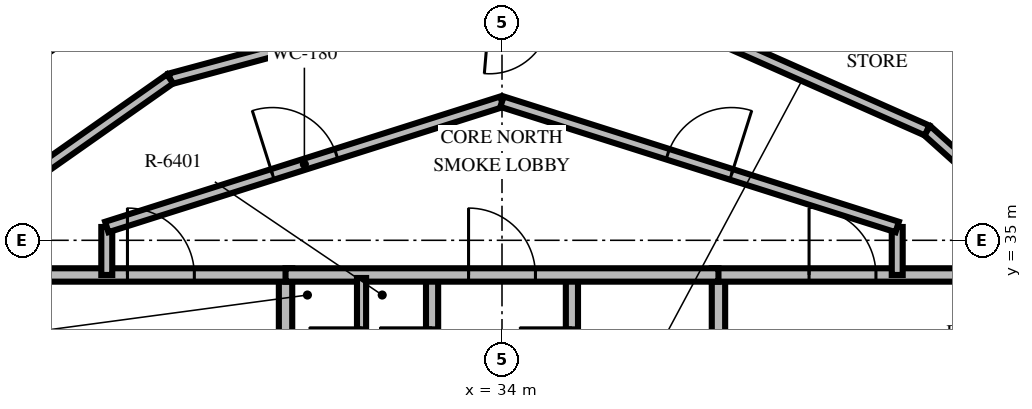
"""IFC4 building model, lengths in metres.
Left out: names, types, materials, properties, quantities, classifications, styles, units other than length and angle.
Written with IfcOpenShell. Run it as: python <this file> out.ifc"""

import sys

from ifc_helpers import new_model, si_unit, direction, frame, frame_2d, origin, place, context, subcontext, project, spatial, rectangle, extrude, element, fill, save


model = new_model("IFC4")
c1 = context("Model", 3, precision=1e-05, world=origin(), true_north=direction((0.0, 1.0)))
c2 = subcontext(c1, "Body", "Model", "MODEL_VIEW")
j1 = project(units=[si_unit("LENGTHUNIT", "METRE"), si_unit("PLANEANGLEUNIT", "RADIAN")], contexts=[c1])
p1 = place(None, origin())
s1 = spatial("IfcSite", under=j1, at=p1, CompositionType="ELEMENT")
p2 = place(p1, origin())
s2 = spatial("IfcBuilding", under=s1, at=p2, CompositionType="ELEMENT")
p3 = place(p2, frame((0.0, 0.0, 259.2)))
s3 = spatial("IfcBuildingStorey", under=s2, at=p3, CompositionType="ELEMENT", Elevation=259.2)
p4 = place(p3, frame((28.572, 42.589, 0.0), z_axis=(0.0, 0.0, 1.0), x_axis=(-0.771526956165, -0.636196633055, 0.0)))
e1 = element("IfcWall", 1, at=p4, inside=s3, PredefinedType="SOLIDWALL", context=c2, shape_type="SweptSolid", body=[
    extrude(rectangle(XDim=7.115, YDim=0.3, at=frame_2d((3.558, 0.0))), origin(), (0.0, 0.0, 1.0), 2.76),
])
p5 = place(p4, frame((2.508, 0.0, 0.8)))
e2 = element("IfcOpeningElement", 2, at=p5, cuts=e1, PredefinedType="OPENING", context=c2, shape_type="SweptSolid", body=[
    extrude(rectangle(XDim=2.1, YDim=1.85, at=frame_2d((1.05, 0.925))), frame((0.0, 0.16, 0.0), z_axis=(0.0, -1.0, 0.0), x_axis=(1.0, 0.0, 0.0)), (0.0, 0.0, 1.0), 0.32),
])
p6 = place(p3, frame((30.44, 30.05, 0.0), z_axis=(0.0, 0.0, 1.0), x_axis=(0.0, 1.0, 0.0)))
e3 = element("IfcWall", 3, at=p6, inside=s3, PredefinedType="SOLIDWALL", context=c2, shape_type="SweptSolid", body=[
    extrude(rectangle(XDim=4.38, YDim=0.22, at=frame_2d((2.19, 0.0))), origin(), (0.0, 0.0, 1.0), 2.46),
])
p7 = place(p6, frame((0.8, 0.0, 0.0)))
e4 = element("IfcOpeningElement", 4, at=p7, cuts=e3, PredefinedType="OPENING", context=c2, shape_type="SweptSolid", body=[
    extrude(rectangle(XDim=1.05, YDim=2.1, at=frame_2d((0.525, 1.05))), frame((0.0, 0.12, 0.0), z_axis=(0.0, -1.0, 0.0), x_axis=(1.0, 0.0, 0.0)), (0.0, 0.0, 1.0), 0.24),
])
p8 = place(p3, frame((26.24, 34.43, 0.0), z_axis=(0.0, 0.0, 1.0), x_axis=(1.0, 0.0, 0.0)))
e5 = element("IfcWall", 5, at=p8, inside=s3, PredefinedType="SOLIDWALL", context=c2, shape_type="SweptSolid", body=[
    extrude(rectangle(XDim=4.31, YDim=0.22, at=frame_2d((2.155, 0.0))), origin(), (0.0, 0.0, 1.0), 2.46),
])
p9 = place(p8, frame((1.6, 0.0, 0.0)))
e6 = element("IfcOpeningElement", 6, at=p9, cuts=e5, PredefinedType="OPENING", context=c2, shape_type="SweptSolid", body=[
    extrude(rectangle(XDim=1.1, YDim=2.15, at=frame_2d((0.55, 1.075))), frame((0.0, 0.12, 0.0), z_axis=(0.0, -1.0, 0.0), x_axis=(1.0, 0.0, 0.0)), (0.0, 0.0, 1.0), 0.24),
])
p10 = place(p3, frame((32.85, 30.05, 0.0), z_axis=(0.0, 0.0, 1.0), x_axis=(0.0, 1.0, 0.0)))
e7 = element("IfcWall", 7, at=p10, inside=s3, PredefinedType="SOLIDWALL", context=c2, shape_type="SweptSolid", body=[
    extrude(rectangle(XDim=4.38, YDim=0.2, at=frame_2d((2.19, 0.0))), origin(), (0.0, 0.0, 1.0), 2.46),
])
p11 = place(p10, frame((2.65, 0.0, 0.0)))
e8 = element("IfcOpeningElement", 8, at=p11, cuts=e7, PredefinedType="OPENING", context=c2, shape_type="SweptSolid", body=[
    extrude(rectangle(XDim=0.86, YDim=2.05, at=frame_2d((0.43, 1.025))), frame((0.0, 0.11, 0.0), z_axis=(0.0, -1.0, 0.0), x_axis=(1.0, 0.0, 0.0)), (0.0, 0.0, 1.0), 0.22),
])
p12 = place(p3, frame((37.56, 30.05, 0.0), z_axis=(0.0, 0.0, 1.0), x_axis=(0.0, 1.0, 0.0)))
e9 = element("IfcWall", 9, at=p12, inside=s3, PredefinedType="SOLIDWALL", context=c2, shape_type="SweptSolid", body=[
    extrude(rectangle(XDim=4.38, YDim=0.22, at=frame_2d((2.19, 0.0))), origin(), (0.0, 0.0, 1.0), 2.46),
])
p13 = place(p12, frame((0.8, 0.0, 0.0)))
e10 = element("IfcOpeningElement", 10, at=p13, cuts=e9, PredefinedType="OPENING", context=c2, shape_type="SweptSolid", body=[
    extrude(rectangle(XDim=1.05, YDim=2.1, at=frame_2d((0.525, 1.05))), frame((0.0, 0.12, 0.0), z_axis=(0.0, -1.0, 0.0), x_axis=(1.0, 0.0, 0.0)), (0.0, 0.0, 1.0), 0.24),
])
p14 = place(p3, frame((37.45, 34.43, 0.0), z_axis=(0.0, 0.0, 1.0), x_axis=(1.0, 0.0, 0.0)))
e11 = element("IfcWall", 11, at=p14, inside=s3, PredefinedType="SOLIDWALL", context=c2, shape_type="SweptSolid", body=[
    extrude(rectangle(XDim=4.31, YDim=0.22, at=frame_2d((2.155, 0.0))), origin(), (0.0, 0.0, 1.0), 2.46),
])
p15 = place(p14, frame((1.6, 0.0, 0.0)))
e12 = element("IfcOpeningElement", 12, at=p15, cuts=e11, PredefinedType="OPENING", context=c2, shape_type="SweptSolid", body=[
    extrude(rectangle(XDim=1.1, YDim=2.15, at=frame_2d((0.55, 1.075))), frame((0.0, 0.12, 0.0), z_axis=(0.0, -1.0, 0.0), x_axis=(1.0, 0.0, 0.0)), (0.0, 0.0, 1.0), 0.24),
])
p16 = place(p3, frame((35.15, 30.05, 0.0), z_axis=(0.0, 0.0, 1.0), x_axis=(0.0, 1.0, 0.0)))
e13 = element("IfcWall", 13, at=p16, inside=s3, PredefinedType="SOLIDWALL", context=c2, shape_type="SweptSolid", body=[
    extrude(rectangle(XDim=4.38, YDim=0.2, at=frame_2d((2.19, 0.0))), origin(), (0.0, 0.0, 1.0), 2.46),
])
p17 = place(p16, frame((2.65, 0.0, 0.0)))
e14 = element("IfcOpeningElement", 14, at=p17, cuts=e13, PredefinedType="OPENING", context=c2, shape_type="SweptSolid", body=[
    extrude(rectangle(XDim=0.86, YDim=2.05, at=frame_2d((0.43, 1.025))), frame((0.0, 0.11, 0.0), z_axis=(0.0, -1.0, 0.0), x_axis=(1.0, 0.0, 0.0)), (0.0, 0.0, 1.0), 0.22),
])
p18 = place(p3, frame((30.44, 34.43, 0.0), z_axis=(0.0, 0.0, 1.0), x_axis=(1.0, 0.0, 0.0)))
e15 = element("IfcWall", 15, at=p18, inside=s3, PredefinedType="SOLIDWALL", context=c2, shape_type="SweptSolid", body=[
    extrude(rectangle(XDim=7.12, YDim=0.22, at=frame_2d((3.56, 0.0))), origin(), (0.0, 0.0, 1.0), 2.46),
])
p19 = place(p18, frame((3.01, 0.0, 0.0)))
e16 = element("IfcOpeningElement", 16, at=p19, cuts=e15, PredefinedType="OPENING", context=c2, shape_type="SweptSolid", body=[
    extrude(rectangle(XDim=1.1, YDim=2.15, at=frame_2d((0.55, 1.075))), frame((0.0, 0.12, 0.0), z_axis=(0.0, -1.0, 0.0), x_axis=(1.0, 0.0, 0.0)), (0.0, 0.0, 1.0), 0.24),
])
p20 = place(p3, frame((31.69, 32.05, 0.0), z_axis=(0.0, 0.0, 1.0), x_axis=(0.0, 1.0, 0.0)))
e17 = element("IfcWall", 17, at=p20, inside=s3, PredefinedType="PARTITIONING", context=c2, shape_type="SweptSolid", body=[
    extrude(rectangle(XDim=2.33, YDim=0.15, at=frame_2d((1.165, 0.0))), origin(), (0.0, 0.0, 1.0), 2.46),
])
p21 = place(p20, frame((0.65, 0.0, 0.0)))
e18 = element("IfcOpeningElement", 18, at=p21, cuts=e17, PredefinedType="OPENING", context=c2, shape_type="SweptSolid", body=[
    extrude(rectangle(XDim=0.86, YDim=2.05, at=frame_2d((0.43, 1.025))), frame((0.0, 0.085, 0.0), z_axis=(0.0, -1.0, 0.0), x_axis=(1.0, 0.0, 0.0)), (0.0, 0.0, 1.0), 0.17),
])
for number, where, z_axis, x_axis in (
    (19, (27.5, 34.43, 0.0), (0.0, 0.0, 1.0), (0.0, 1.0, 0.0)),
    (20, (40.5, 35.219, 0.0), (0.0, 0.0, 1.0), (0.0, -1.0, 0.0)),
):
    element("IfcWall", number, at=place(p3, frame(where, z_axis=z_axis, x_axis=x_axis)), inside=s3, PredefinedType="PARTITIONING", context=c2, shape_type="SweptSolid", body=[
        extrude(rectangle(XDim=0.789, YDim=0.18, at=frame_2d((0.395, 0.0))), origin(), (0.0, 0.0, 1.0), 2.46),
    ])
p22 = place(p3, frame((27.5, 35.219, 0.0), z_axis=(0.0, 0.0, 1.0), x_axis=(0.953228121756, 0.302251795518, 0.0)))
e21 = element("IfcWall", 21, at=p22, inside=s3, PredefinedType="PARTITIONING", context=c2, shape_type="SweptSolid", body=[
    extrude(rectangle(XDim=6.819, YDim=0.18, at=frame_2d((3.409, 0.0))), origin(), (0.0, 0.0, 1.0), 2.46),
])
p23 = place(p22, frame((2.86, 0.0, 0.0)))
e22 = element("IfcOpeningElement", 22, at=p23, cuts=e21, PredefinedType="OPENING", context=c2, shape_type="SweptSolid", body=[
    extrude(rectangle(XDim=1.1, YDim=2.15, at=frame_2d((0.55, 1.075))), frame((0.0, 0.1, 0.0), z_axis=(0.0, -1.0, 0.0), x_axis=(1.0, 0.0, 0.0)), (0.0, 0.0, 1.0), 0.2),
])
p24 = place(p3, frame((34.0, 37.28, 0.0), z_axis=(0.0, 0.0, 1.0), x_axis=(0.953228121756, -0.302251795518, 0.0)))
e23 = element("IfcWall", 23, at=p24, inside=s3, PredefinedType="PARTITIONING", context=c2, shape_type="SweptSolid", body=[
    extrude(rectangle(XDim=6.819, YDim=0.18, at=frame_2d((3.409, 0.0))), origin(), (0.0, 0.0, 1.0), 2.46),
])
p25 = place(p24, frame((2.86, 0.0, 0.0)))
e24 = element("IfcOpeningElement", 24, at=p25, cuts=e23, PredefinedType="OPENING", context=c2, shape_type="SweptSolid", body=[
    extrude(rectangle(XDim=1.1, YDim=2.15, at=frame_2d((0.55, 1.075))), frame((0.0, 0.1, 0.0), z_axis=(0.0, -1.0, 0.0), x_axis=(1.0, 0.0, 0.0)), (0.0, 0.0, 1.0), 0.2),
])
p26 = place(p3, frame((43.988, 34.117, 0.0), z_axis=(0.0, 0.0, 1.0), x_axis=(-0.744300239782, 0.6678451565, 0.0)))
e25 = element("IfcWall", 25, at=p26, inside=s3, PredefinedType="PARTITIONING", context=c2, shape_type="SweptSolid", body=[
    extrude(rectangle(XDim=4.027, YDim=0.18, at=frame_2d((2.013, 0.0))), origin(), (0.0, 0.0, 1.0), 2.46),
])
p27 = place(p26, frame((0.832, 0.0, 0.0)))
e26 = element("IfcOpeningElement", 26, at=p27, cuts=e25, PredefinedType="OPENING", context=c2, shape_type="SweptSolid", body=[
    extrude(rectangle(XDim=1.0, YDim=2.15, at=frame_2d((0.5, 1.075))), frame((0.0, 0.1, 0.0), z_axis=(0.0, -1.0, 0.0), x_axis=(1.0, 0.0, 0.0)), (0.0, 0.0, 1.0), 0.2),
])
p28 = place(p3, frame((40.991, 36.806, 0.0), z_axis=(0.0, 0.0, 1.0), x_axis=(-0.914256044606, 0.405136871812, 0.0)))
e27 = element("IfcWall", 27, at=p28, inside=s3, PredefinedType="PARTITIONING", context=c2, shape_type="SweptSolid", body=[
    extrude(rectangle(XDim=4.027, YDim=0.18, at=frame_2d((2.013, 0.0))), origin(), (0.0, 0.0, 1.0), 2.46),
])
p29 = place(p3, frame((32.856, 38.819, 0.0), z_axis=(0.0, 0.0, 1.0), x_axis=(-0.965477450323, -0.260486646333, 0.0)))
e28 = element("IfcWall", 28, at=p29, inside=s3, PredefinedType="PARTITIONING", context=c2, shape_type="SweptSolid", body=[
    extrude(rectangle(XDim=4.47, YDim=0.18, at=frame_2d((2.235, 0.0))), origin(), (0.0, 0.0, 1.0), 2.46),
])
p30 = place(p3, frame((28.541, 37.655, 0.0), z_axis=(0.0, 0.0, 1.0), x_axis=(-0.818142386299, -0.57501568304, 0.0)))
e29 = element("IfcWall", 29, at=p30, inside=s3, PredefinedType="PARTITIONING", context=c2, shape_type="SweptSolid", body=[
    extrude(rectangle(XDim=4.469, YDim=0.18, at=frame_2d((2.235, 0.0))), origin(), (0.0, 0.0, 1.0), 2.46),
])
p31 = place(p3, frame((27.862, 39.104, 0.0), z_axis=(0.0, 0.0, 1.0), x_axis=(-0.818173783984, -0.574971007271, 0.0)))
e30 = element("IfcWall", 30, at=p31, inside=s3, PredefinedType="PARTITIONING", context=c2, shape_type="SweptSolid", body=[
    extrude(rectangle(XDim=5.025, YDim=0.16, at=frame_2d((2.513, 0.0))), origin(), (0.0, 0.0, 1.0), 2.46),
])
p32 = place(p9, origin())
e31 = element("IfcDoor", 31, at=p32, inside=s3, OperationType="SINGLE_SWING_LEFT", PredefinedType="DOOR", context=c2, shape_type="SweptSolid", body=[
    extrude(rectangle(XDim=1.1, YDim=2.15, at=frame_2d((0.55, 1.075))), frame((0.0, 0.025, 0.0), z_axis=(0.0, -1.0, 0.0), x_axis=(1.0, 0.0, 0.0)), (0.0, 0.0, 1.0), 0.05),
])
fill(e6, e31)
p33 = place(p11, origin())
e32 = element("IfcDoor", 32, at=p33, inside=s3, OperationType="SINGLE_SWING_RIGHT", PredefinedType="TRAPDOOR", context=c2, shape_type="SweptSolid", body=[
    extrude(rectangle(XDim=0.86, YDim=2.05, at=frame_2d((0.43, 1.025))), frame((0.0, 0.025, 0.0), z_axis=(0.0, -1.0, 0.0), x_axis=(1.0, 0.0, 0.0)), (0.0, 0.0, 1.0), 0.05),
])
fill(e8, e32)
p34 = place(p15, origin())
e33 = element("IfcDoor", 33, at=p34, inside=s3, OperationType="SINGLE_SWING_LEFT", PredefinedType="DOOR", context=c2, shape_type="SweptSolid", body=[
    extrude(rectangle(XDim=1.1, YDim=2.15, at=frame_2d((0.55, 1.075))), frame((0.0, 0.025, 0.0), z_axis=(0.0, -1.0, 0.0), x_axis=(1.0, 0.0, 0.0)), (0.0, 0.0, 1.0), 0.05),
])
fill(e12, e33)
p35 = place(p17, origin())
e34 = element("IfcDoor", 34, at=p35, inside=s3, OperationType="SINGLE_SWING_RIGHT", PredefinedType="TRAPDOOR", context=c2, shape_type="SweptSolid", body=[
    extrude(rectangle(XDim=0.86, YDim=2.05, at=frame_2d((0.43, 1.025))), frame((0.0, 0.025, 0.0), z_axis=(0.0, -1.0, 0.0), x_axis=(1.0, 0.0, 0.0)), (0.0, 0.0, 1.0), 0.05),
])
fill(e14, e34)
p36 = place(p19, origin())
e35 = element("IfcDoor", 35, at=p36, inside=s3, OperationType="SINGLE_SWING_LEFT", PredefinedType="DOOR", context=c2, shape_type="SweptSolid", body=[
    extrude(rectangle(XDim=1.1, YDim=2.15, at=frame_2d((0.55, 1.075))), frame((0.0, 0.025, 0.0), z_axis=(0.0, -1.0, 0.0), x_axis=(1.0, 0.0, 0.0)), (0.0, 0.0, 1.0), 0.05),
])
fill(e16, e35)
p37 = place(p21, origin())
e36 = element("IfcDoor", 36, at=p37, inside=s3, OperationType="SINGLE_SWING_RIGHT", PredefinedType="TRAPDOOR", context=c2, shape_type="SweptSolid", body=[
    extrude(rectangle(XDim=0.86, YDim=2.05, at=frame_2d((0.43, 1.025))), frame((0.0, 0.025, 0.0), z_axis=(0.0, -1.0, 0.0), x_axis=(1.0, 0.0, 0.0)), (0.0, 0.0, 1.0), 0.05),
])
fill(e18, e36)
p38 = place(p23, origin())
e37 = element("IfcDoor", 37, at=p38, inside=s3, OperationType="SINGLE_SWING_LEFT", PredefinedType="DOOR", context=c2, shape_type="SweptSolid", body=[
    extrude(rectangle(XDim=1.1, YDim=2.15, at=frame_2d((0.55, 1.075))), frame((0.0, 0.025, 0.0), z_axis=(0.0, -1.0, 0.0), x_axis=(1.0, 0.0, 0.0)), (0.0, 0.0, 1.0), 0.05),
])
fill(e22, e37)
p39 = place(p25, origin())
e38 = element("IfcDoor", 38, at=p39, inside=s3, OperationType="SINGLE_SWING_RIGHT", PredefinedType="DOOR", context=c2, shape_type="SweptSolid", body=[
    extrude(rectangle(XDim=1.1, YDim=2.15, at=frame_2d((0.55, 1.075))), frame((0.0, 0.025, 0.0), z_axis=(0.0, -1.0, 0.0), x_axis=(1.0, 0.0, 0.0)), (0.0, 0.0, 1.0), 0.05),
])
fill(e24, e38)
save(model, sys.argv[1])
